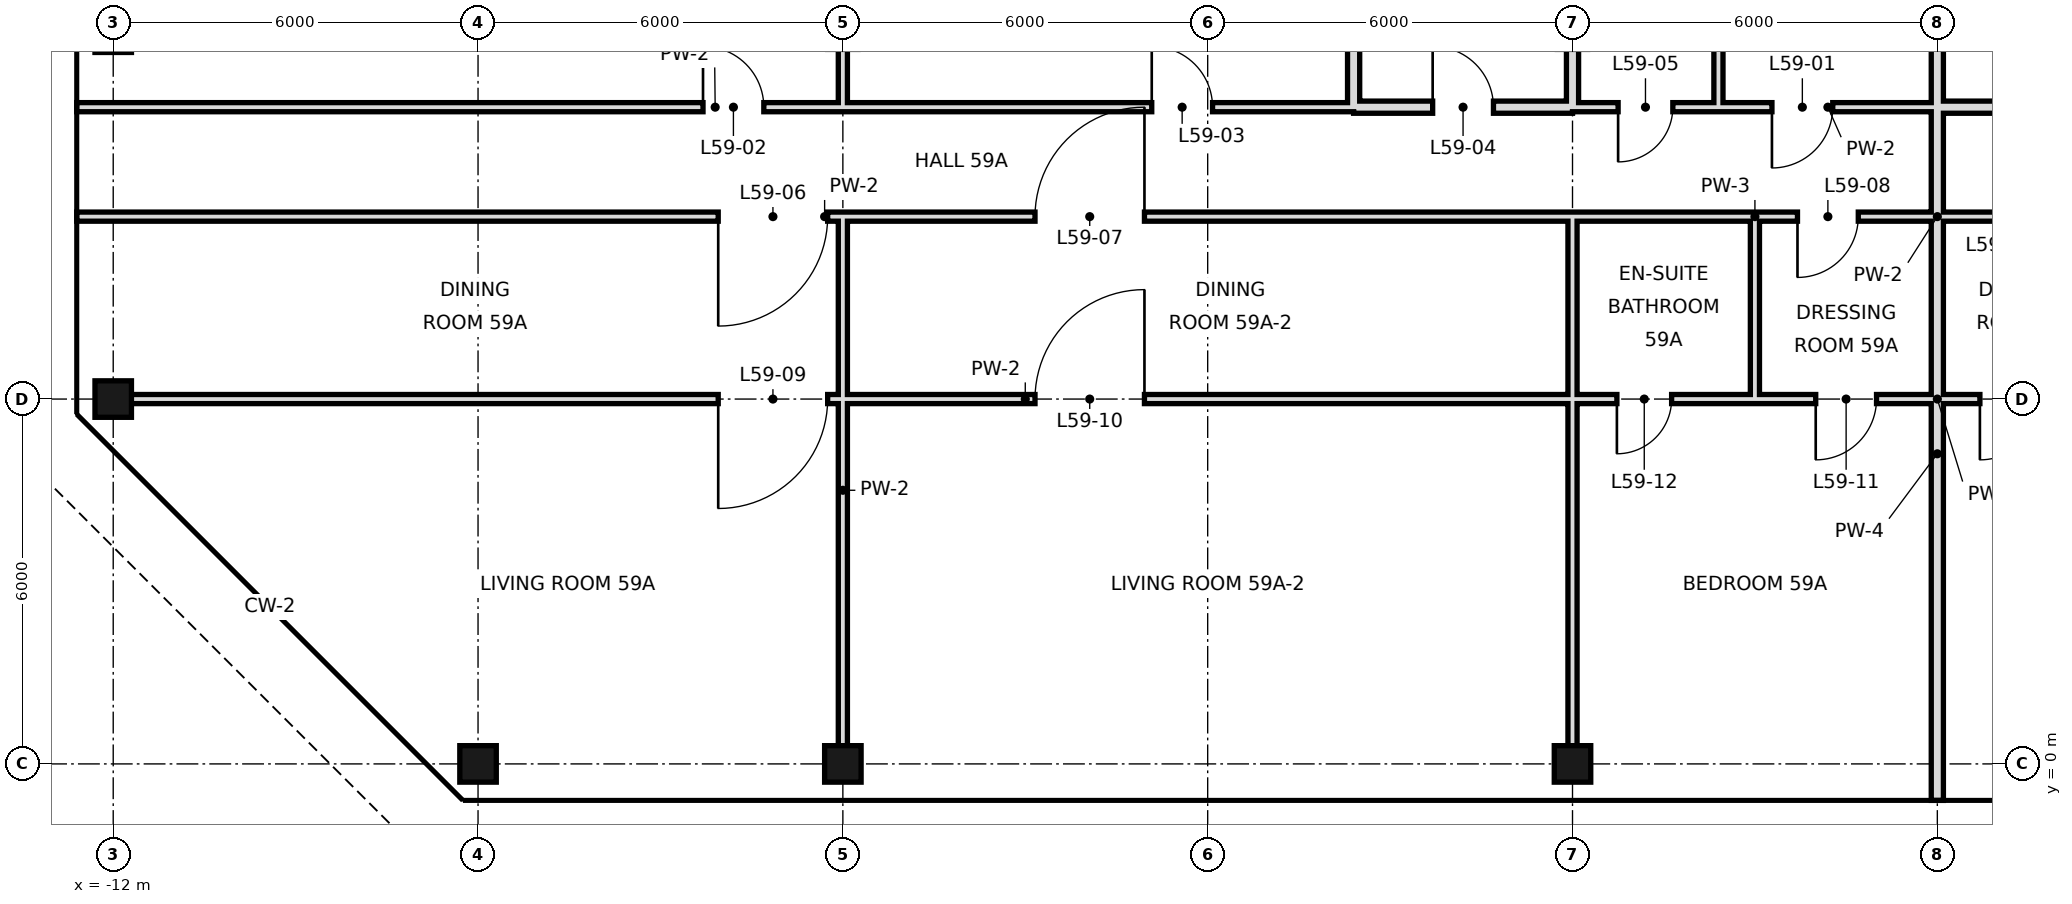
"""IFC4 building model, lengths in metres.
Left out: names, types, materials, properties, quantities, classifications, styles, units other than length and angle.
Written with IfcOpenShell. Run it as: python <this file> out.ifc"""

import sys

from ifc_helpers import new_model, si_unit, direction, frame, frame_2d, origin, origin_2d, place, context, subcontext, project, spatial, rectangle, hollow_rectangle, extrude, element, fill, save


model = new_model("IFC4")
c1 = context("Model", 3, precision=1e-05, world=origin(), true_north=direction((0.0, 1.0)))
c2 = subcontext(c1, "Body", "Model", "MODEL_VIEW")
j1 = project(units=[si_unit("LENGTHUNIT", "METRE"), si_unit("PLANEANGLEUNIT", "RADIAN")], contexts=[c1])
p1 = place(None, origin())
s1 = spatial("IfcSite", under=j1, at=p1, CompositionType="ELEMENT")
p2 = place(p1, origin())
s2 = spatial("IfcBuilding", under=s1, at=p2, CompositionType="ELEMENT")
p3 = place(p2, frame((0.0, 0.0, 250.4)))
s3 = spatial("IfcBuildingStorey", under=s2, at=p3, CompositionType="ELEMENT", Elevation=250.4)
for number, where, z_axis, x_axis in (
    (1, (-12.0, 6.0, 0.0), (0.0, 0.0, 1.0), (1.0, 0.0, 0.0)),
    (2, (-6.0, 0.0, 0.0), (0.0, 0.0, 1.0), (1.0, 0.0, 0.0)),
    (3, (0.0, 0.0, 0.0), (0.0, 0.0, 1.0), (1.0, 0.0, 0.0)),
    (4, (12.0, 0.0, 0.0), (0.0, 0.0, 1.0), (1.0, 0.0, 0.0)),
):
    element("IfcColumn", number, at=place(p3, frame(where, z_axis=z_axis, x_axis=x_axis)), inside=s3, PredefinedType="COLUMN", context=c2, shape_type="SweptSolid", body=[
        extrude(hollow_rectangle(XDim=0.6, YDim=0.6, WallThickness=0.028, at=origin_2d()), origin(), (0.0, 0.0, 1.0), 3.6),
    ])
p4 = place(p3, frame((0.0, 0.0, 0.0), z_axis=(0.0, 0.0, 1.0), x_axis=(0.0, 1.0, 0.0)))
e5 = element("IfcWall", 5, at=p4, inside=s3, PredefinedType="PARTITIONING", context=c2, shape_type="SweptSolid", body=[
    extrude(rectangle(XDim=9.0, YDim=0.15, at=frame_2d((4.5, 0.0))), origin(), (0.0, 0.0, 1.0), 2.72),
])
p5 = place(p3, frame((0.0, 10.8, 0.0), z_axis=(0.0, 0.0, 1.0), x_axis=(0.0, 1.0, 0.0)))
e6 = element("IfcWall", 6, at=p5, inside=s3, PredefinedType="PARTITIONING", context=c2, shape_type="SweptSolid", body=[
    extrude(rectangle(XDim=7.2, YDim=0.15, at=frame_2d((3.6, 0.0))), origin(), (0.0, 0.0, 1.0), 2.72),
])
p6 = place(p3, frame((12.0, 10.8, 0.0), z_axis=(0.0, 0.0, 1.0), x_axis=(0.0, 1.0, 0.0)))
e7 = element("IfcWall", 7, at=p6, inside=s3, PredefinedType="SOLIDWALL", context=c2, shape_type="SweptSolid", body=[
    extrude(rectangle(XDim=7.9, YDim=0.2, at=frame_2d((3.95, 0.0))), origin(), (0.0, 0.0, 1.0), 2.72),
])
p7 = place(p3, frame((12.0, 0.0, 0.0), z_axis=(0.0, 0.0, 1.0), x_axis=(0.0, 1.0, 0.0)))
e8 = element("IfcWall", 8, at=p7, inside=s3, PredefinedType="PARTITIONING", context=c2, shape_type="SweptSolid", body=[
    extrude(rectangle(XDim=6.0, YDim=0.15, at=frame_2d((3.0, 0.0))), origin(), (0.0, 0.0, 1.0), 2.72),
])
p8 = place(p3, frame((12.0, 6.0, 0.0), z_axis=(0.0, 0.0, 1.0), x_axis=(0.0, 1.0, 0.0)))
e9 = element("IfcWall", 9, at=p8, inside=s3, PredefinedType="PARTITIONING", context=c2, shape_type="SweptSolid", body=[
    extrude(rectangle(XDim=3.0, YDim=0.15, at=frame_2d((1.5, 0.0))), origin(), (0.0, 0.0, 1.0), 2.72),
])
p9 = place(p3, frame((14.4, 10.8, 0.0), z_axis=(0.0, 0.0, 1.0), x_axis=(0.0, 1.0, 0.0)))
e10 = element("IfcWall", 10, at=p9, inside=s3, PredefinedType="PARTITIONING", context=c2, shape_type="SweptSolid", body=[
    extrude(rectangle(XDim=7.9, YDim=0.15, at=frame_2d((3.95, 0.0))), origin(), (0.0, 0.0, 1.0), 3.42),
])
p10 = place(p3, frame((15.0, 6.0, 0.0), z_axis=(0.0, 0.0, 1.0), x_axis=(0.0, 1.0, 0.0)))
e11 = element("IfcWall", 11, at=p10, inside=s3, PredefinedType="PARTITIONING", context=c2, shape_type="SweptSolid", body=[
    extrude(rectangle(XDim=3.0, YDim=0.15, at=frame_2d((1.5, 0.0))), origin(), (0.0, 0.0, 1.0), 3.42),
])
p11 = place(p3, frame((18.0, 10.8, 0.0), z_axis=(0.0, 0.0, 1.0), x_axis=(0.0, 1.0, 0.0)))
e12 = element("IfcWall", 12, at=p11, inside=s3, PredefinedType="SOLIDWALL", context=c2, shape_type="SweptSolid", body=[
    extrude(rectangle(XDim=7.9, YDim=0.2, at=frame_2d((3.95, 0.0))), origin(), (0.0, 0.0, 1.0), 2.72),
])
p12 = place(p3, frame((18.0, -0.6, 0.0), z_axis=(0.0, 0.0, 1.0), x_axis=(0.0, 1.0, 0.0)))
e13 = element("IfcWall", 13, at=p12, inside=s3, PredefinedType="SOLIDWALL", context=c2, shape_type="SweptSolid", body=[
    extrude(rectangle(XDim=11.4, YDim=0.2, at=frame_2d((5.7, 0.0))), origin(), (0.0, 0.0, 1.0), 2.72),
])
p13 = place(p3, frame((8.4, 10.8, 0.0), z_axis=(0.0, 0.0, 1.0), x_axis=(0.0, 1.0, 0.0)))
e14 = element("IfcWall", 14, at=p13, inside=s3, PredefinedType="SOLIDWALL", context=c2, shape_type="SweptSolid", body=[
    extrude(rectangle(XDim=7.9, YDim=0.2, at=frame_2d((3.95, 0.0))), origin(), (0.0, 0.0, 1.0), 2.72),
])
p14 = place(p3, frame((8.4, 10.8, 0.0), z_axis=(0.0, 0.0, 1.0), x_axis=(1.0, 0.0, 0.0)))
e15 = element("IfcWall", 15, at=p14, inside=s3, PredefinedType="SOLIDWALL", context=c2, shape_type="SweptSolid", body=[
    extrude(rectangle(XDim=3.6, YDim=0.2, at=frame_2d((1.8, 0.0))), origin(), (0.0, 0.0, 1.0), 2.72),
])
p15 = place(p14, frame((1.3, 0.0, 0.0)))
e16 = element("IfcOpeningElement", 16, at=p15, cuts=e15, PredefinedType="OPENING", context=c2, shape_type="SweptSolid", body=[
    extrude(rectangle(XDim=1.0, YDim=2.4, at=frame_2d((0.5, 1.2))), frame((0.0, 0.11, 0.0), z_axis=(0.0, -1.0, 0.0), x_axis=(1.0, 0.0, 0.0)), (0.0, 0.0, 1.0), 0.22),
])
p16 = place(p3, frame((18.0, 10.8, 0.0), z_axis=(0.0, 0.0, 1.0), x_axis=(1.0, 0.0, 0.0)))
e17 = element("IfcWall", 17, at=p16, inside=s3, PredefinedType="SOLIDWALL", context=c2, shape_type="SweptSolid", body=[
    extrude(rectangle(XDim=5.4, YDim=0.2, at=frame_2d((2.7, 0.0))), origin(), (0.0, 0.0, 1.0), 2.72),
])
p17 = place(p16, frame((2.2, 0.0, 0.0)))
e18 = element("IfcOpeningElement", 18, at=p17, cuts=e17, PredefinedType="OPENING", context=c2, shape_type="SweptSolid", body=[
    extrude(rectangle(XDim=1.0, YDim=2.4, at=frame_2d((0.5, 1.2))), frame((0.0, 0.11, 0.0), z_axis=(0.0, -1.0, 0.0), x_axis=(1.0, 0.0, 0.0)), (0.0, 0.0, 1.0), 0.22),
])
p18 = place(p3, frame((-12.6, 10.8, 0.0), z_axis=(0.0, 0.0, 1.0), x_axis=(1.0, 0.0, 0.0)))
e19 = element("IfcWall", 19, at=p18, inside=s3, PredefinedType="PARTITIONING", context=c2, shape_type="SweptSolid", body=[
    extrude(rectangle(XDim=21.0, YDim=0.15, at=frame_2d((10.5, 0.0))), origin(), (0.0, 0.0, 1.0), 3.42),
])
p19 = place(p18, frame((10.3, 0.0, 0.0)))
e20 = element("IfcOpeningElement", 20, at=p19, cuts=e19, PredefinedType="OPENING", context=c2, shape_type="SweptSolid", body=[
    extrude(rectangle(XDim=1.0, YDim=2.4, at=frame_2d((0.5, 1.2))), frame((0.0, 0.085, 0.0), z_axis=(0.0, -1.0, 0.0), x_axis=(1.0, 0.0, 0.0)), (0.0, 0.0, 1.0), 0.17),
])
p20 = place(p18, frame((17.68, 0.0, 0.0)))
e21 = element("IfcOpeningElement", 21, at=p20, cuts=e19, PredefinedType="OPENING", context=c2, shape_type="SweptSolid", body=[
    extrude(rectangle(XDim=1.0, YDim=2.4, at=frame_2d((0.5, 1.2))), frame((0.0, 0.085, 0.0), z_axis=(0.0, -1.0, 0.0), x_axis=(1.0, 0.0, 0.0)), (0.0, 0.0, 1.0), 0.17),
])
p21 = place(p3, frame((14.4, 10.8, 0.0), z_axis=(0.0, 0.0, 1.0), x_axis=(1.0, 0.0, 0.0)))
e22 = element("IfcWall", 22, at=p21, inside=s3, PredefinedType="PARTITIONING", context=c2, shape_type="SweptSolid", body=[
    extrude(rectangle(XDim=3.6, YDim=0.15, at=frame_2d((1.8, 0.0))), origin(), (0.0, 0.0, 1.0), 3.42),
])
p22 = place(p21, frame((0.88, 0.0, 0.0)))
e23 = element("IfcOpeningElement", 23, at=p22, cuts=e22, PredefinedType="OPENING", context=c2, shape_type="SweptSolid", body=[
    extrude(rectangle(XDim=1.0, YDim=2.4, at=frame_2d((0.5, 1.2))), frame((0.0, 0.085, 0.0), z_axis=(0.0, -1.0, 0.0), x_axis=(1.0, 0.0, 0.0)), (0.0, 0.0, 1.0), 0.17),
])
p23 = place(p3, frame((12.0, 10.8, 0.0), z_axis=(0.0, 0.0, 1.0), x_axis=(1.0, 0.0, 0.0)))
e24 = element("IfcWall", 24, at=p23, inside=s3, PredefinedType="PARTITIONING", context=c2, shape_type="SweptSolid", body=[
    extrude(rectangle(XDim=2.4, YDim=0.15, at=frame_2d((1.2, 0.0))), origin(), (0.0, 0.0, 1.0), 3.42),
])
p24 = place(p23, frame((0.75, 0.0, 0.0)))
e25 = element("IfcOpeningElement", 25, at=p24, cuts=e24, PredefinedType="OPENING", context=c2, shape_type="SweptSolid", body=[
    extrude(rectangle(XDim=0.9, YDim=2.4, at=frame_2d((0.45, 1.2))), frame((0.0, 0.085, 0.0), z_axis=(0.0, -1.0, 0.0), x_axis=(1.0, 0.0, 0.0)), (0.0, 0.0, 1.0), 0.17),
])
p25 = place(p3, frame((-12.0, 6.0, 0.0), z_axis=(0.0, 0.0, 1.0), x_axis=(1.0, 0.0, 0.0)))
e26 = element("IfcWall", 26, at=p25, inside=s3, PredefinedType="PARTITIONING", context=c2, shape_type="SweptSolid", body=[
    extrude(rectangle(XDim=24.0, YDim=0.15, at=frame_2d((12.0, 0.0))), origin(), (0.0, 0.0, 1.0), 2.72),
])
p26 = place(p25, frame((9.95, 0.0, 0.0)))
e27 = element("IfcOpeningElement", 27, at=p26, cuts=e26, PredefinedType="OPENING", context=c2, shape_type="SweptSolid", body=[
    extrude(rectangle(XDim=1.8, YDim=2.4, at=frame_2d((0.9, 1.2))), frame((0.0, 0.085, 0.0), z_axis=(0.0, -1.0, 0.0), x_axis=(1.0, 0.0, 0.0)), (0.0, 0.0, 1.0), 0.17),
])
p27 = place(p25, frame((15.16, 0.0, 0.0)))
e28 = element("IfcOpeningElement", 28, at=p27, cuts=e26, PredefinedType="OPENING", context=c2, shape_type="SweptSolid", body=[
    extrude(rectangle(XDim=1.8, YDim=2.4, at=frame_2d((0.9, 1.2))), frame((0.0, 0.085, 0.0), z_axis=(0.0, -1.0, 0.0), x_axis=(1.0, 0.0, 0.0)), (0.0, 0.0, 1.0), 0.17),
])
p28 = place(p3, frame((15.0, 6.0, 0.0), z_axis=(0.0, 0.0, 1.0), x_axis=(1.0, 0.0, 0.0)))
e29 = element("IfcWall", 29, at=p28, inside=s3, PredefinedType="PARTITIONING", context=c2, shape_type="SweptSolid", body=[
    extrude(rectangle(XDim=6.0, YDim=0.15, at=frame_2d((3.0, 0.0))), origin(), (0.0, 0.0, 1.0), 2.97),
])
p29 = place(p28, frame((1.0, 0.0, 0.0)))
e30 = element("IfcOpeningElement", 30, at=p29, cuts=e29, PredefinedType="OPENING", context=c2, shape_type="SweptSolid", body=[
    extrude(rectangle(XDim=1.0, YDim=2.4, at=frame_2d((0.5, 1.2))), frame((0.0, 0.085, 0.0), z_axis=(0.0, -1.0, 0.0), x_axis=(1.0, 0.0, 0.0)), (0.0, 0.0, 1.0), 0.17),
])
p30 = place(p28, frame((3.7, 0.0, 0.0)))
e31 = element("IfcOpeningElement", 31, at=p30, cuts=e29, PredefinedType="OPENING", context=c2, shape_type="SweptSolid", body=[
    extrude(rectangle(XDim=1.0, YDim=2.4, at=frame_2d((0.5, 1.2))), frame((0.0, 0.085, 0.0), z_axis=(0.0, -1.0, 0.0), x_axis=(1.0, 0.0, 0.0)), (0.0, 0.0, 1.0), 0.17),
])
p31 = place(p3, frame((12.0, 6.0, 0.0), z_axis=(0.0, 0.0, 1.0), x_axis=(1.0, 0.0, 0.0)))
e32 = element("IfcWall", 32, at=p31, inside=s3, PredefinedType="PARTITIONING", context=c2, shape_type="SweptSolid", body=[
    extrude(rectangle(XDim=3.0, YDim=0.15, at=frame_2d((1.5, 0.0))), origin(), (0.0, 0.0, 1.0), 2.97),
])
p32 = place(p31, frame((0.73, 0.0, 0.0)))
e33 = element("IfcOpeningElement", 33, at=p32, cuts=e32, PredefinedType="OPENING", context=c2, shape_type="SweptSolid", body=[
    extrude(rectangle(XDim=0.9, YDim=2.4, at=frame_2d((0.45, 1.2))), frame((0.0, 0.085, 0.0), z_axis=(0.0, -1.0, 0.0), x_axis=(1.0, 0.0, 0.0)), (0.0, 0.0, 1.0), 0.17),
])
p33 = place(p3, frame((-12.6, 9.0, 0.0), z_axis=(0.0, 0.0, 1.0), x_axis=(1.0, 0.0, 0.0)))
e34 = element("IfcWall", 34, at=p33, inside=s3, PredefinedType="PARTITIONING", context=c2, shape_type="SweptSolid", body=[
    extrude(rectangle(XDim=24.6, YDim=0.15, at=frame_2d((12.3, 0.0))), origin(), (0.0, 0.0, 1.0), 3.42),
])
p34 = place(p33, frame((10.55, 0.0, 0.0)))
e35 = element("IfcOpeningElement", 35, at=p34, cuts=e34, PredefinedType="OPENING", context=c2, shape_type="SweptSolid", body=[
    extrude(rectangle(XDim=1.8, YDim=2.4, at=frame_2d((0.9, 1.2))), frame((0.0, 0.085, 0.0), z_axis=(0.0, -1.0, 0.0), x_axis=(1.0, 0.0, 0.0)), (0.0, 0.0, 1.0), 0.17),
])
p35 = place(p33, frame((15.76, 0.0, 0.0)))
e36 = element("IfcOpeningElement", 36, at=p35, cuts=e34, PredefinedType="OPENING", context=c2, shape_type="SweptSolid", body=[
    extrude(rectangle(XDim=1.8, YDim=2.4, at=frame_2d((0.9, 1.2))), frame((0.0, 0.085, 0.0), z_axis=(0.0, -1.0, 0.0), x_axis=(1.0, 0.0, 0.0)), (0.0, 0.0, 1.0), 0.17),
])
p36 = place(p3, frame((15.0, 9.0, 0.0), z_axis=(0.0, 0.0, 1.0), x_axis=(1.0, 0.0, 0.0)))
e37 = element("IfcWall", 37, at=p36, inside=s3, PredefinedType="PARTITIONING", context=c2, shape_type="SweptSolid", body=[
    extrude(rectangle(XDim=6.0, YDim=0.15, at=frame_2d((3.0, 0.0))), origin(), (0.0, 0.0, 1.0), 3.42),
])
p37 = place(p36, frame((0.7, 0.0, 0.0)))
e38 = element("IfcOpeningElement", 38, at=p37, cuts=e37, PredefinedType="OPENING", context=c2, shape_type="SweptSolid", body=[
    extrude(rectangle(XDim=1.0, YDim=2.4, at=frame_2d((0.5, 1.2))), frame((0.0, 0.085, 0.0), z_axis=(0.0, -1.0, 0.0), x_axis=(1.0, 0.0, 0.0)), (0.0, 0.0, 1.0), 0.17),
])
p38 = place(p36, frame((4.0, 0.0, 0.0)))
e39 = element("IfcOpeningElement", 39, at=p38, cuts=e37, PredefinedType="OPENING", context=c2, shape_type="SweptSolid", body=[
    extrude(rectangle(XDim=1.0, YDim=2.4, at=frame_2d((0.5, 1.2))), frame((0.0, 0.085, 0.0), z_axis=(0.0, -1.0, 0.0), x_axis=(1.0, 0.0, 0.0)), (0.0, 0.0, 1.0), 0.17),
])
p39 = place(p3, frame((12.0, 9.0, 0.0), z_axis=(0.0, 0.0, 1.0), x_axis=(1.0, 0.0, 0.0)))
e40 = element("IfcWall", 40, at=p39, inside=s3, PredefinedType="PARTITIONING", context=c2, shape_type="SweptSolid", body=[
    extrude(rectangle(XDim=3.0, YDim=0.15, at=frame_2d((1.5, 0.0))), origin(), (0.0, 0.0, 1.0), 3.42),
])
p40 = place(p22, frame((1.0, 0.0, 0.0), z_axis=(0.0, 0.0, 1.0), x_axis=(-1.0, 0.0, 0.0)))
e41 = element("IfcDoor", 41, at=p40, inside=s3, OperationType="SINGLE_SWING_RIGHT", PredefinedType="DOOR", context=c2, shape_type="SweptSolid", body=[
    extrude(rectangle(XDim=1.0, YDim=2.4, at=frame_2d((0.5, 1.2))), frame((0.0, 0.025, 0.0), z_axis=(0.0, -1.0, 0.0), x_axis=(1.0, 0.0, 0.0)), (0.0, 0.0, 1.0), 0.05),
])
fill(e23, e41)
p41 = place(p19, origin())
e42 = element("IfcDoor", 42, at=p41, inside=s3, OperationType="SINGLE_SWING_LEFT", PredefinedType="DOOR", context=c2, shape_type="SweptSolid", body=[
    extrude(rectangle(XDim=1.0, YDim=2.4, at=frame_2d((0.5, 1.2))), frame((0.0, 0.025, 0.0), z_axis=(0.0, -1.0, 0.0), x_axis=(1.0, 0.0, 0.0)), (0.0, 0.0, 1.0), 0.05),
])
fill(e20, e42)
p42 = place(p20, origin())
e43 = element("IfcDoor", 43, at=p42, inside=s3, OperationType="SINGLE_SWING_LEFT", PredefinedType="DOOR", context=c2, shape_type="SweptSolid", body=[
    extrude(rectangle(XDim=1.0, YDim=2.4, at=frame_2d((0.5, 1.2))), frame((0.0, 0.025, 0.0), z_axis=(0.0, -1.0, 0.0), x_axis=(1.0, 0.0, 0.0)), (0.0, 0.0, 1.0), 0.05),
])
fill(e21, e43)
p43 = place(p15, origin())
e44 = element("IfcDoor", 44, at=p43, inside=s3, OperationType="SINGLE_SWING_LEFT", PredefinedType="DOOR", context=c2, shape_type="SweptSolid", body=[
    extrude(rectangle(XDim=1.0, YDim=2.4, at=frame_2d((0.5, 1.2))), frame((0.0, 0.025, 0.0), z_axis=(0.0, -1.0, 0.0), x_axis=(1.0, 0.0, 0.0)), (0.0, 0.0, 1.0), 0.05),
])
fill(e16, e44)
p44 = place(p24, frame((0.9, 0.0, 0.0), z_axis=(0.0, 0.0, 1.0), x_axis=(-1.0, 0.0, 0.0)))
e45 = element("IfcDoor", 45, at=p44, inside=s3, OperationType="SINGLE_SWING_RIGHT", PredefinedType="DOOR", context=c2, shape_type="SweptSolid", body=[
    extrude(rectangle(XDim=0.9, YDim=2.4, at=frame_2d((0.45, 1.2))), frame((0.0, 0.025, 0.0), z_axis=(0.0, -1.0, 0.0), x_axis=(1.0, 0.0, 0.0)), (0.0, 0.0, 1.0), 0.05),
])
fill(e25, e45)
p45 = place(p34, frame((1.8, 0.0, 0.0), z_axis=(0.0, 0.0, 1.0), x_axis=(-1.0, 0.0, 0.0)))
e46 = element("IfcDoor", 46, at=p45, inside=s3, OperationType="SINGLE_SWING_RIGHT", PredefinedType="DOOR", context=c2, shape_type="SweptSolid", body=[
    extrude(rectangle(XDim=1.8, YDim=2.4, at=frame_2d((0.9, 1.2))), frame((0.0, 0.025, 0.0), z_axis=(0.0, -1.0, 0.0), x_axis=(1.0, 0.0, 0.0)), (0.0, 0.0, 1.0), 0.05),
])
fill(e35, e46)
p46 = place(p35, frame((1.8, 0.0, 0.0), z_axis=(0.0, 0.0, 1.0), x_axis=(-1.0, 0.0, 0.0)))
e47 = element("IfcDoor", 47, at=p46, inside=s3, OperationType="SINGLE_SWING_LEFT", PredefinedType="DOOR", context=c2, shape_type="SweptSolid", body=[
    extrude(rectangle(XDim=1.8, YDim=2.4, at=frame_2d((0.9, 1.2))), frame((0.0, 0.025, 0.0), z_axis=(0.0, -1.0, 0.0), x_axis=(1.0, 0.0, 0.0)), (0.0, 0.0, 1.0), 0.05),
])
fill(e36, e47)
p47 = place(p37, frame((1.0, 0.0, 0.0), z_axis=(0.0, 0.0, 1.0), x_axis=(-1.0, 0.0, 0.0)))
e48 = element("IfcDoor", 48, at=p47, inside=s3, OperationType="SINGLE_SWING_RIGHT", PredefinedType="DOOR", context=c2, shape_type="SweptSolid", body=[
    extrude(rectangle(XDim=1.0, YDim=2.4, at=frame_2d((0.5, 1.2))), frame((0.0, 0.025, 0.0), z_axis=(0.0, -1.0, 0.0), x_axis=(1.0, 0.0, 0.0)), (0.0, 0.0, 1.0), 0.05),
])
fill(e38, e48)
p48 = place(p26, frame((1.8, 0.0, 0.0), z_axis=(0.0, 0.0, 1.0), x_axis=(-1.0, 0.0, 0.0)))
e49 = element("IfcDoor", 49, at=p48, inside=s3, OperationType="SINGLE_SWING_RIGHT", PredefinedType="DOOR", context=c2, shape_type="SweptSolid", body=[
    extrude(rectangle(XDim=1.8, YDim=2.4, at=frame_2d((0.9, 1.2))), frame((0.0, 0.025, 0.0), z_axis=(0.0, -1.0, 0.0), x_axis=(1.0, 0.0, 0.0)), (0.0, 0.0, 1.0), 0.05),
])
fill(e27, e49)
p49 = place(p27, frame((1.8, 0.0, 0.0), z_axis=(0.0, 0.0, 1.0), x_axis=(-1.0, 0.0, 0.0)))
e50 = element("IfcDoor", 50, at=p49, inside=s3, OperationType="SINGLE_SWING_LEFT", PredefinedType="DOOR", context=c2, shape_type="SweptSolid", body=[
    extrude(rectangle(XDim=1.8, YDim=2.4, at=frame_2d((0.9, 1.2))), frame((0.0, 0.025, 0.0), z_axis=(0.0, -1.0, 0.0), x_axis=(1.0, 0.0, 0.0)), (0.0, 0.0, 1.0), 0.05),
])
fill(e28, e50)
p50 = place(p29, frame((1.0, 0.0, 0.0), z_axis=(0.0, 0.0, 1.0), x_axis=(-1.0, 0.0, 0.0)))
e51 = element("IfcDoor", 51, at=p50, inside=s3, OperationType="SINGLE_SWING_RIGHT", PredefinedType="DOOR", context=c2, shape_type="SweptSolid", body=[
    extrude(rectangle(XDim=1.0, YDim=2.4, at=frame_2d((0.5, 1.2))), frame((0.0, 0.025, 0.0), z_axis=(0.0, -1.0, 0.0), x_axis=(1.0, 0.0, 0.0)), (0.0, 0.0, 1.0), 0.05),
])
fill(e30, e51)
p51 = place(p32, frame((0.9, 0.0, 0.0), z_axis=(0.0, 0.0, 1.0), x_axis=(-1.0, 0.0, 0.0)))
e52 = element("IfcDoor", 52, at=p51, inside=s3, OperationType="SINGLE_SWING_RIGHT", PredefinedType="DOOR", context=c2, shape_type="SweptSolid", body=[
    extrude(rectangle(XDim=0.9, YDim=2.4, at=frame_2d((0.45, 1.2))), frame((0.0, 0.025, 0.0), z_axis=(0.0, -1.0, 0.0), x_axis=(1.0, 0.0, 0.0)), (0.0, 0.0, 1.0), 0.05),
])
fill(e33, e52)
p52 = place(p30, frame((1.0, 0.0, 0.0), z_axis=(0.0, 0.0, 1.0), x_axis=(-1.0, 0.0, 0.0)))
e53 = element("IfcDoor", 53, at=p52, inside=s3, OperationType="SINGLE_SWING_RIGHT", PredefinedType="DOOR", context=c2, shape_type="SweptSolid", body=[
    extrude(rectangle(XDim=1.0, YDim=2.4, at=frame_2d((0.5, 1.2))), frame((0.0, 0.025, 0.0), z_axis=(0.0, -1.0, 0.0), x_axis=(1.0, 0.0, 0.0)), (0.0, 0.0, 1.0), 0.05),
])
fill(e31, e53)
save(model, sys.argv[1])
